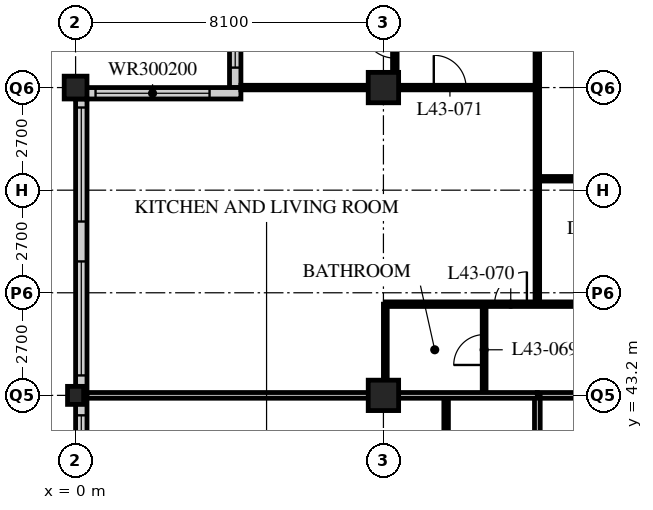
"""IFC4 building model, lengths in metres.
Left out: names, types, materials, properties, quantities, classifications, styles, units other than length and angle.
Written with IfcOpenShell. Run it as: python <this file> out.ifc"""

import sys

from ifc_helpers import new_model, si_unit, direction, frame, frame_2d, origin, origin_2d, place, context, subcontext, project, spatial, rectangle, hollow_rectangle, i_section, extrude, element, fill, save


model = new_model("IFC4")
c1 = context("Model", 3, precision=1e-05, world=origin(), true_north=direction((0.0, 1.0)))
c2 = subcontext(c1, "Body", "Model", "MODEL_VIEW")
j1 = project(units=[si_unit("LENGTHUNIT", "METRE"), si_unit("PLANEANGLEUNIT", "RADIAN")], contexts=[c1])
p1 = place(None, origin())
s1 = spatial("IfcSite", under=j1, at=p1, CompositionType="ELEMENT")
p2 = place(p1, origin())
s2 = spatial("IfcBuilding", under=s1, at=p2, CompositionType="ELEMENT")
p3 = place(p2, frame((0.0, 0.0, 170.4)))
s3 = spatial("IfcBuildingStorey", under=s2, at=p3, CompositionType="ELEMENT", Elevation=170.4)
p4 = place(p3, frame((0.0, 43.2, 0.0), z_axis=(0.0, 0.0, 1.0), x_axis=(1.0, 0.0, 0.0)))
e1 = element("IfcColumn", 1, at=p4, inside=s3, PredefinedType="COLUMN", context=c2, shape_type="SweptSolid", body=[
    extrude(i_section(OverallWidth=0.424, OverallDepth=0.475, WebThickness=0.048, FlangeThickness=0.077, FilletRadius=0.015, at=origin_2d()), origin(), (0.0, 0.0, 1.0), 3.6),
])
p5 = place(p3, frame((0.0, 51.3, 0.0), z_axis=(0.0, 0.0, 1.0), x_axis=(1.0, 0.0, 0.0)))
e2 = element("IfcColumn", 2, at=p5, inside=s3, PredefinedType="COLUMN", context=c2, shape_type="SweptSolid", body=[
    extrude(hollow_rectangle(XDim=0.6, YDim=0.6, WallThickness=0.05, at=origin_2d()), origin(), (0.0, 0.0, 1.0), 3.6),
])
for number, where, z_axis, x_axis in (
    (3, (8.1, 43.2, 0.0), (0.0, 0.0, 1.0), (1.0, 0.0, 0.0)),
    (4, (8.1, 51.3, 0.0), (0.0, 0.0, 1.0), (1.0, 0.0, 0.0)),
):
    element("IfcColumn", number, at=place(p3, frame(where, z_axis=z_axis, x_axis=x_axis)), inside=s3, PredefinedType="COLUMN", context=c2, shape_type="SweptSolid", body=[
        extrude(hollow_rectangle(XDim=0.8, YDim=0.8, WallThickness=0.08, at=origin_2d()), origin(), (0.0, 0.0, 1.0), 3.6),
    ])
p6 = place(p3, frame((4.2, 55.05, 0.0), z_axis=(0.0, 0.0, 1.0), x_axis=(0.0, -1.0, 0.0)))
e5 = element("IfcWall", 5, at=p6, inside=s3, PredefinedType="SOLIDWALL", context=c2, shape_type="SweptSolid", body=[
    extrude(rectangle(XDim=3.75, YDim=0.3, at=frame_2d((1.875, 0.0))), origin(), (0.0, 0.0, 1.0), 3.39),
])
p7 = place(p6, frame((0.225, 0.0, 0.6)))
e6 = element("IfcOpeningElement", 6, at=p7, cuts=e5, PredefinedType="OPENING", context=c2, shape_type="SweptSolid", body=[
    extrude(rectangle(XDim=3.0, YDim=2.0, at=frame_2d((1.5, 1.0))), frame((0.0, 0.16, 0.0), z_axis=(0.0, -1.0, 0.0), x_axis=(1.0, 0.0, 0.0)), (0.0, 0.0, 1.0), 0.32),
])
p8 = place(p3, frame((4.35, 51.15, 0.0), z_axis=(0.0, 0.0, 1.0), x_axis=(-1.0, 0.0, 0.0)))
e7 = element("IfcWall", 7, at=p8, inside=s3, PredefinedType="SOLIDWALL", context=c2, shape_type="SweptSolid", body=[
    extrude(rectangle(XDim=4.35, YDim=0.3, at=frame_2d((2.175, 0.0))), origin(), (0.0, 0.0, 1.0), 3.39),
])
p9 = place(p8, frame((0.825, 0.0, 0.6)))
e8 = element("IfcOpeningElement", 8, at=p9, cuts=e7, PredefinedType="OPENING", context=c2, shape_type="SweptSolid", body=[
    extrude(rectangle(XDim=3.0, YDim=2.0, at=frame_2d((1.5, 1.0))), frame((0.0, 0.16, 0.0), z_axis=(0.0, -1.0, 0.0), x_axis=(1.0, 0.0, 0.0)), (0.0, 0.0, 1.0), 0.32),
])
p10 = place(p3, frame((0.15, 51.0, 0.0), z_axis=(0.0, 0.0, 1.0), x_axis=(0.0, -1.0, 0.0)))
e9 = element("IfcWall", 9, at=p10, inside=s3, PredefinedType="SOLIDWALL", context=c2, shape_type="SweptSolid", body=[
    extrude(rectangle(XDim=32.1, YDim=0.3, at=frame_2d((16.05, 0.0))), origin(), (0.0, 0.0, 1.0), 3.39),
])
p11 = place(p10, frame((0.225, 0.0, 0.6)))
e10 = element("IfcOpeningElement", 10, at=p11, cuts=e9, PredefinedType="OPENING", context=c2, shape_type="SweptSolid", body=[
    extrude(rectangle(XDim=3.0, YDim=2.4, at=frame_2d((1.5, 1.2))), frame((0.0, 0.16, 0.0), z_axis=(0.0, -1.0, 0.0), x_axis=(1.0, 0.0, 0.0)), (0.0, 0.0, 1.0), 0.32),
])
p12 = place(p10, frame((4.275, 0.0, 0.6)))
e11 = element("IfcOpeningElement", 11, at=p12, cuts=e9, PredefinedType="OPENING", context=c2, shape_type="SweptSolid", body=[
    extrude(rectangle(XDim=3.0, YDim=2.4, at=frame_2d((1.5, 1.2))), frame((0.0, 0.16, 0.0), z_axis=(0.0, -1.0, 0.0), x_axis=(1.0, 0.0, 0.0)), (0.0, 0.0, 1.0), 0.32),
])
p13 = place(p10, frame((8.325, 0.0, 0.6)))
e12 = element("IfcOpeningElement", 12, at=p13, cuts=e9, PredefinedType="OPENING", context=c2, shape_type="SweptSolid", body=[
    extrude(rectangle(XDim=3.0, YDim=2.4, at=frame_2d((1.5, 1.2))), frame((0.0, 0.16, 0.0), z_axis=(0.0, -1.0, 0.0), x_axis=(1.0, 0.0, 0.0)), (0.0, 0.0, 1.0), 0.32),
])
p14 = place(p10, frame((12.375, 0.0, 0.6)))
e13 = element("IfcOpeningElement", 13, at=p14, cuts=e9, PredefinedType="OPENING", context=c2, shape_type="SweptSolid", body=[
    extrude(rectangle(XDim=3.0, YDim=2.4, at=frame_2d((1.5, 1.2))), frame((0.0, 0.16, 0.0), z_axis=(0.0, -1.0, 0.0), x_axis=(1.0, 0.0, 0.0)), (0.0, 0.0, 1.0), 0.32),
])
p15 = place(p10, frame((16.425, 0.0, 0.6)))
e14 = element("IfcOpeningElement", 14, at=p15, cuts=e9, PredefinedType="OPENING", context=c2, shape_type="SweptSolid", body=[
    extrude(rectangle(XDim=3.0, YDim=2.4, at=frame_2d((1.5, 1.2))), frame((0.0, 0.16, 0.0), z_axis=(0.0, -1.0, 0.0), x_axis=(1.0, 0.0, 0.0)), (0.0, 0.0, 1.0), 0.32),
])
p16 = place(p10, frame((20.475, 0.0, 0.6)))
e15 = element("IfcOpeningElement", 15, at=p16, cuts=e9, PredefinedType="OPENING", context=c2, shape_type="SweptSolid", body=[
    extrude(rectangle(XDim=3.0, YDim=2.4, at=frame_2d((1.5, 1.2))), frame((0.0, 0.16, 0.0), z_axis=(0.0, -1.0, 0.0), x_axis=(1.0, 0.0, 0.0)), (0.0, 0.0, 1.0), 0.32),
])
p17 = place(p10, frame((24.525, 0.0, 0.6)))
e16 = element("IfcOpeningElement", 16, at=p17, cuts=e9, PredefinedType="OPENING", context=c2, shape_type="SweptSolid", body=[
    extrude(rectangle(XDim=3.0, YDim=2.4, at=frame_2d((1.5, 1.2))), frame((0.0, 0.16, 0.0), z_axis=(0.0, -1.0, 0.0), x_axis=(1.0, 0.0, 0.0)), (0.0, 0.0, 1.0), 0.32),
])
p18 = place(p10, frame((28.575, 0.0, 0.6)))
e17 = element("IfcOpeningElement", 17, at=p18, cuts=e9, PredefinedType="OPENING", context=c2, shape_type="SweptSolid", body=[
    extrude(rectangle(XDim=3.0, YDim=2.4, at=frame_2d((1.5, 1.2))), frame((0.0, 0.16, 0.0), z_axis=(0.0, -1.0, 0.0), x_axis=(1.0, 0.0, 0.0)), (0.0, 0.0, 1.0), 0.32),
])
p19 = place(p3, frame((12.15, 43.2, 0.0), z_axis=(0.0, 0.0, 1.0), x_axis=(1.0, 0.0, 0.0)))
e18 = element("IfcWall", 18, at=p19, inside=s3, PredefinedType="PARTITIONING", context=c2, shape_type="SweptSolid", body=[
    extrude(rectangle(XDim=32.4, YDim=0.15, at=frame_2d((16.2, 0.0))), origin(), (0.0, 0.0, 1.0), 2.778),
])
p20 = place(p19, frame((4.95, 0.0, 0.0)))
e19 = element("IfcOpeningElement", 19, at=p20, cuts=e18, PredefinedType="OPENING", context=c2, shape_type="SweptSolid", body=[
    extrude(rectangle(XDim=1.0, YDim=2.1, at=frame_2d((0.5, 1.05))), frame((0.0, 0.085, 0.0), z_axis=(0.0, -1.0, 0.0), x_axis=(1.0, 0.0, 0.0)), (0.0, 0.0, 1.0), 0.17),
])
p21 = place(p19, frame((13.05, 0.0, 0.0)))
e20 = element("IfcOpeningElement", 20, at=p21, cuts=e18, PredefinedType="OPENING", context=c2, shape_type="SweptSolid", body=[
    extrude(rectangle(XDim=1.0, YDim=2.1, at=frame_2d((0.5, 1.05))), frame((0.0, 0.085, 0.0), z_axis=(0.0, -1.0, 0.0), x_axis=(1.0, 0.0, 0.0)), (0.0, 0.0, 1.0), 0.17),
])
p22 = place(p19, frame((21.15, 0.0, 0.0)))
e21 = element("IfcOpeningElement", 21, at=p22, cuts=e18, PredefinedType="OPENING", context=c2, shape_type="SweptSolid", body=[
    extrude(rectangle(XDim=1.0, YDim=2.1, at=frame_2d((0.5, 1.05))), frame((0.0, 0.085, 0.0), z_axis=(0.0, -1.0, 0.0), x_axis=(1.0, 0.0, 0.0)), (0.0, 0.0, 1.0), 0.17),
])
p23 = place(p19, frame((29.875, 0.0, 0.0)))
e22 = element("IfcOpeningElement", 22, at=p23, cuts=e18, PredefinedType="OPENING", context=c2, shape_type="SweptSolid", body=[
    extrude(rectangle(XDim=1.0, YDim=2.1, at=frame_2d((0.5, 1.05))), frame((0.0, 0.085, 0.0), z_axis=(0.0, -1.0, 0.0), x_axis=(1.0, 0.0, 0.0)), (0.0, 0.0, 1.0), 0.17),
])
p24 = place(p19, frame((1.525, 0.0, 0.0)))
e23 = element("IfcOpeningElement", 23, at=p24, cuts=e18, PredefinedType="OPENING", context=c2, shape_type="SweptSolid", body=[
    extrude(rectangle(XDim=1.0, YDim=2.1, at=frame_2d((0.5, 1.05))), frame((0.0, 0.085, 0.0), z_axis=(0.0, -1.0, 0.0), x_axis=(1.0, 0.0, 0.0)), (0.0, 0.0, 1.0), 0.17),
])
p25 = place(p3, frame((12.15, 18.9, 0.0), z_axis=(0.0, 0.0, 1.0), x_axis=(0.0, 1.0, 0.0)))
e24 = element("IfcWall", 24, at=p25, inside=s3, PredefinedType="PARTITIONING", context=c2, shape_type="SweptSolid", body=[
    extrude(rectangle(XDim=24.3, YDim=0.15, at=frame_2d((12.15, 0.0))), origin(), (0.0, 0.0, 1.0), 3.39),
])
p26 = place(p25, frame((2.35, 0.0, 0.0)))
e25 = element("IfcOpeningElement", 25, at=p26, cuts=e24, PredefinedType="OPENING", context=c2, shape_type="SweptSolid", body=[
    extrude(rectangle(XDim=1.0, YDim=2.1, at=frame_2d((0.5, 1.05))), frame((0.0, 0.085, 0.0), z_axis=(0.0, -1.0, 0.0), x_axis=(1.0, 0.0, 0.0)), (0.0, 0.0, 1.0), 0.17),
])
p27 = place(p25, frame((6.4, 0.0, 0.0)))
e26 = element("IfcOpeningElement", 26, at=p27, cuts=e24, PredefinedType="OPENING", context=c2, shape_type="SweptSolid", body=[
    extrude(rectangle(XDim=1.0, YDim=2.1, at=frame_2d((0.5, 1.05))), frame((0.0, 0.085, 0.0), z_axis=(0.0, -1.0, 0.0), x_axis=(1.0, 0.0, 0.0)), (0.0, 0.0, 1.0), 0.17),
])
p28 = place(p25, frame((8.5, 0.0, 0.0)))
e27 = element("IfcOpeningElement", 27, at=p28, cuts=e24, PredefinedType="OPENING", context=c2, shape_type="SweptSolid", body=[
    extrude(rectangle(XDim=1.0, YDim=2.1, at=frame_2d((0.5, 1.05))), frame((0.0, 0.085, 0.0), z_axis=(0.0, -1.0, 0.0), x_axis=(1.0, 0.0, 0.0)), (0.0, 0.0, 1.0), 0.17),
])
p29 = place(p25, frame((16.6, 0.0, 0.0)))
e28 = element("IfcOpeningElement", 28, at=p29, cuts=e24, PredefinedType="OPENING", context=c2, shape_type="SweptSolid", body=[
    extrude(rectangle(XDim=1.0, YDim=2.1, at=frame_2d((0.5, 1.05))), frame((0.0, 0.085, 0.0), z_axis=(0.0, -1.0, 0.0), x_axis=(1.0, 0.0, 0.0)), (0.0, 0.0, 1.0), 0.17),
])
p30 = place(p3, frame((9.75, 27.0, 0.0), z_axis=(0.0, 0.0, 1.0), x_axis=(0.0, 1.0, 0.0)))
e29 = element("IfcWall", 29, at=p30, inside=s3, PredefinedType="PARTITIONING", context=c2, shape_type="SweptSolid", body=[
    extrude(rectangle(XDim=16.2, YDim=0.12, at=frame_2d((8.1, 0.0))), origin(), (0.0, 0.0, 1.0), 3.39),
])
p31 = place(p30, frame((0.975, 0.0, 0.0)))
e30 = element("IfcOpeningElement", 30, at=p31, cuts=e29, PredefinedType="OPENING", context=c2, shape_type="SweptSolid", body=[
    extrude(rectangle(XDim=0.85, YDim=2.1, at=frame_2d((0.425, 1.05))), frame((0.0, 0.07, 0.0), z_axis=(0.0, -1.0, 0.0), x_axis=(1.0, 0.0, 0.0)), (0.0, 0.0, 1.0), 0.14),
])
p32 = place(p30, frame((4.375, 0.0, 0.0)))
e31 = element("IfcOpeningElement", 31, at=p32, cuts=e29, PredefinedType="OPENING", context=c2, shape_type="SweptSolid", body=[
    extrude(rectangle(XDim=0.85, YDim=2.1, at=frame_2d((0.425, 1.05))), frame((0.0, 0.07, 0.0), z_axis=(0.0, -1.0, 0.0), x_axis=(1.0, 0.0, 0.0)), (0.0, 0.0, 1.0), 0.14),
])
p33 = place(p30, frame((9.075, 0.0, 0.0)))
e32 = element("IfcOpeningElement", 32, at=p33, cuts=e29, PredefinedType="OPENING", context=c2, shape_type="SweptSolid", body=[
    extrude(rectangle(XDim=0.85, YDim=2.1, at=frame_2d((0.425, 1.05))), frame((0.0, 0.07, 0.0), z_axis=(0.0, -1.0, 0.0), x_axis=(1.0, 0.0, 0.0)), (0.0, 0.0, 1.0), 0.14),
])
p34 = place(p30, frame((12.475, 0.0, 0.0)))
e33 = element("IfcOpeningElement", 33, at=p34, cuts=e29, PredefinedType="OPENING", context=c2, shape_type="SweptSolid", body=[
    extrude(rectangle(XDim=0.85, YDim=2.1, at=frame_2d((0.425, 1.05))), frame((0.0, 0.07, 0.0), z_axis=(0.0, -1.0, 0.0), x_axis=(1.0, 0.0, 0.0)), (0.0, 0.0, 1.0), 0.14),
])
p35 = place(p3, frame((10.75, 43.2, 0.0), z_axis=(0.0, 0.0, 1.0), x_axis=(0.0, 1.0, 0.0)))
e34 = element("IfcWall", 34, at=p35, inside=s3, PredefinedType="PARTITIONING", context=c2, shape_type="SweptSolid", body=[
    extrude(rectangle(XDim=2.4, YDim=0.1, at=frame_2d((1.2, 0.0))), origin(), (0.0, 0.0, 1.0), 3.39),
])
p36 = place(p35, frame((0.8, 0.0, 0.0)))
e35 = element("IfcOpeningElement", 35, at=p36, cuts=e34, PredefinedType="OPENING", context=c2, shape_type="SweptSolid", body=[
    extrude(rectangle(XDim=0.8, YDim=2.1, at=frame_2d((0.4, 1.05))), frame((0.0, 0.06, 0.0), z_axis=(0.0, -1.0, 0.0), x_axis=(1.0, 0.0, 0.0)), (0.0, 0.0, 1.0), 0.12),
])
p37 = place(p3, frame((8.15, 43.2, 0.0), z_axis=(0.0, 0.0, 1.0), x_axis=(0.0, 1.0, 0.0)))
e36 = element("IfcWall", 36, at=p37, inside=s3, PredefinedType="PARTITIONING", context=c2, shape_type="SweptSolid", body=[
    extrude(rectangle(XDim=2.4, YDim=0.1, at=frame_2d((1.2, 0.0))), origin(), (0.0, 0.0, 1.0), 2.778),
])
p38 = place(p3, frame((8.15, 45.6, 0.0), z_axis=(0.0, 0.0, 1.0), x_axis=(1.0, 0.0, 0.0)))
e37 = element("IfcWall", 37, at=p38, inside=s3, PredefinedType="PARTITIONING", context=c2, shape_type="SweptSolid", body=[
    extrude(rectangle(XDim=40.4, YDim=0.12, at=frame_2d((20.2, 0.0))), origin(), (0.0, 0.0, 1.0), 3.39),
])
p39 = place(p38, frame((9.025, 0.0, 0.0)))
e38 = element("IfcOpeningElement", 38, at=p39, cuts=e37, PredefinedType="OPENING", context=c2, shape_type="SweptSolid", body=[
    extrude(rectangle(XDim=0.85, YDim=2.1, at=frame_2d((0.425, 1.05))), frame((0.0, 0.07, 0.0), z_axis=(0.0, -1.0, 0.0), x_axis=(1.0, 0.0, 0.0)), (0.0, 0.0, 1.0), 0.14),
])
p40 = place(p38, frame((12.425, 0.0, 0.0)))
e39 = element("IfcOpeningElement", 39, at=p40, cuts=e37, PredefinedType="OPENING", context=c2, shape_type="SweptSolid", body=[
    extrude(rectangle(XDim=0.85, YDim=2.1, at=frame_2d((0.425, 1.05))), frame((0.0, 0.07, 0.0), z_axis=(0.0, -1.0, 0.0), x_axis=(1.0, 0.0, 0.0)), (0.0, 0.0, 1.0), 0.14),
])
p41 = place(p38, frame((17.125, 0.0, 0.0)))
e40 = element("IfcOpeningElement", 40, at=p41, cuts=e37, PredefinedType="OPENING", context=c2, shape_type="SweptSolid", body=[
    extrude(rectangle(XDim=0.85, YDim=2.1, at=frame_2d((0.425, 1.05))), frame((0.0, 0.07, 0.0), z_axis=(0.0, -1.0, 0.0), x_axis=(1.0, 0.0, 0.0)), (0.0, 0.0, 1.0), 0.14),
])
p42 = place(p38, frame((20.525, 0.0, 0.0)))
e41 = element("IfcOpeningElement", 41, at=p42, cuts=e37, PredefinedType="OPENING", context=c2, shape_type="SweptSolid", body=[
    extrude(rectangle(XDim=0.85, YDim=2.1, at=frame_2d((0.425, 1.05))), frame((0.0, 0.07, 0.0), z_axis=(0.0, -1.0, 0.0), x_axis=(1.0, 0.0, 0.0)), (0.0, 0.0, 1.0), 0.14),
])
p43 = place(p38, frame((25.225, 0.0, 0.0)))
e42 = element("IfcOpeningElement", 42, at=p43, cuts=e37, PredefinedType="OPENING", context=c2, shape_type="SweptSolid", body=[
    extrude(rectangle(XDim=0.85, YDim=2.1, at=frame_2d((0.425, 1.05))), frame((0.0, 0.07, 0.0), z_axis=(0.0, -1.0, 0.0), x_axis=(1.0, 0.0, 0.0)), (0.0, 0.0, 1.0), 0.14),
])
p44 = place(p38, frame((28.625, 0.0, 0.0)))
e43 = element("IfcOpeningElement", 43, at=p44, cuts=e37, PredefinedType="OPENING", context=c2, shape_type="SweptSolid", body=[
    extrude(rectangle(XDim=0.85, YDim=2.1, at=frame_2d((0.425, 1.05))), frame((0.0, 0.07, 0.0), z_axis=(0.0, -1.0, 0.0), x_axis=(1.0, 0.0, 0.0)), (0.0, 0.0, 1.0), 0.14),
])
p45 = place(p38, frame((32.825, 0.0, 0.0)))
e44 = element("IfcOpeningElement", 44, at=p45, cuts=e37, PredefinedType="OPENING", context=c2, shape_type="SweptSolid", body=[
    extrude(rectangle(XDim=0.85, YDim=2.1, at=frame_2d((0.425, 1.05))), frame((0.0, 0.07, 0.0), z_axis=(0.0, -1.0, 0.0), x_axis=(1.0, 0.0, 0.0)), (0.0, 0.0, 1.0), 0.14),
])
p46 = place(p38, frame((36.675, 0.0, 0.0)))
e45 = element("IfcOpeningElement", 45, at=p46, cuts=e37, PredefinedType="OPENING", context=c2, shape_type="SweptSolid", body=[
    extrude(rectangle(XDim=0.85, YDim=2.1, at=frame_2d((0.425, 1.05))), frame((0.0, 0.07, 0.0), z_axis=(0.0, -1.0, 0.0), x_axis=(1.0, 0.0, 0.0)), (0.0, 0.0, 1.0), 0.14),
])
p47 = place(p38, frame((6.725, 0.0, 0.0)))
e46 = element("IfcOpeningElement", 46, at=p47, cuts=e37, PredefinedType="OPENING", context=c2, shape_type="SweptSolid", body=[
    extrude(rectangle(XDim=0.85, YDim=2.1, at=frame_2d((0.425, 1.05))), frame((0.0, 0.07, 0.0), z_axis=(0.0, -1.0, 0.0), x_axis=(1.0, 0.0, 0.0)), (0.0, 0.0, 1.0), 0.14),
])
p48 = place(p38, frame((2.875, 0.0, 0.0)))
e47 = element("IfcOpeningElement", 47, at=p48, cuts=e37, PredefinedType="OPENING", context=c2, shape_type="SweptSolid", body=[
    extrude(rectangle(XDim=0.85, YDim=2.1, at=frame_2d((0.425, 1.05))), frame((0.0, 0.07, 0.0), z_axis=(0.0, -1.0, 0.0), x_axis=(1.0, 0.0, 0.0)), (0.0, 0.0, 1.0), 0.14),
])
p49 = place(p3, frame((12.15, 45.6, 0.0), z_axis=(0.0, 0.0, 1.0), x_axis=(0.0, 1.0, 0.0)))
e48 = element("IfcWall", 48, at=p49, inside=s3, PredefinedType="PARTITIONING", context=c2, shape_type="SweptSolid", body=[
    extrude(rectangle(XDim=13.5, YDim=0.12, at=frame_2d((6.75, 0.0))), origin(), (0.0, 0.0, 1.0), 3.39),
])
p50 = place(p3, frame((12.15, 51.3, 0.0), z_axis=(0.0, 0.0, 1.0), x_axis=(-1.0, 0.0, 0.0)))
e49 = element("IfcWall", 49, at=p50, inside=s3, PredefinedType="PARTITIONING", context=c2, shape_type="SweptSolid", body=[
    extrude(rectangle(XDim=7.8, YDim=0.12, at=frame_2d((3.9, 0.0))), origin(), (0.0, 0.0, 1.0), 2.778),
])
p51 = place(p50, frame((1.875, 0.0, 0.0)))
e50 = element("IfcOpeningElement", 50, at=p51, cuts=e49, PredefinedType="OPENING", context=c2, shape_type="SweptSolid", body=[
    extrude(rectangle(XDim=0.85, YDim=2.1, at=frame_2d((0.425, 1.05))), frame((0.0, 0.07, 0.0), z_axis=(0.0, -1.0, 0.0), x_axis=(1.0, 0.0, 0.0)), (0.0, 0.0, 1.0), 0.14),
])
p52 = place(p3, frame((0.3, 43.2, 0.0), z_axis=(0.0, 0.0, 1.0), x_axis=(1.0, 0.0, 0.0)))
e51 = element("IfcWall", 51, at=p52, inside=s3, PredefinedType="PARTITIONING", context=c2, shape_type="SweptSolid", body=[
    extrude(rectangle(XDim=11.85, YDim=0.15, at=frame_2d((5.925, 0.0))), origin(), (0.0, 0.0, 1.0), 2.778),
])
p53 = place(p3, frame((8.4, 55.06, 0.0), z_axis=(0.0, 0.0, 1.0), x_axis=(0.0, -1.0, 0.0)))
e52 = element("IfcWall", 52, at=p53, inside=s3, PredefinedType="PARTITIONING", context=c2, shape_type="SweptSolid", body=[
    extrude(rectangle(XDim=3.76, YDim=0.12, at=frame_2d((1.88, 0.0))), origin(), (0.0, 0.0, 1.0), 3.39),
])
p54 = place(p53, frame((2.135, 0.0, 0.0)))
e53 = element("IfcOpeningElement", 53, at=p54, cuts=e52, PredefinedType="OPENING", context=c2, shape_type="SweptSolid", body=[
    extrude(rectangle(XDim=0.85, YDim=2.1, at=frame_2d((0.425, 1.05))), frame((0.0, 0.07, 0.0), z_axis=(0.0, -1.0, 0.0), x_axis=(1.0, 0.0, 0.0)), (0.0, 0.0, 1.0), 0.14),
])
p55 = place(p3, frame((12.15, 48.9, 0.0), z_axis=(0.0, 0.0, 1.0), x_axis=(1.0, 0.0, 0.0)))
e54 = element("IfcWall", 54, at=p55, inside=s3, PredefinedType="PARTITIONING", context=c2, shape_type="SweptSolid", body=[
    extrude(rectangle(XDim=4.05, YDim=0.12, at=frame_2d((2.025, 0.0))), origin(), (0.0, 0.0, 1.0), 3.39),
])
p56 = place(p55, frame((1.6, 0.0, 0.0)))
e55 = element("IfcOpeningElement", 55, at=p56, cuts=e54, PredefinedType="OPENING", context=c2, shape_type="SweptSolid", body=[
    extrude(rectangle(XDim=0.85, YDim=2.1, at=frame_2d((0.425, 1.05))), frame((0.0, 0.07, 0.0), z_axis=(0.0, -1.0, 0.0), x_axis=(1.0, 0.0, 0.0)), (0.0, 0.0, 1.0), 0.14),
])
p57 = place(p7, origin())
e56 = element("IfcWindow", 56, at=p57, inside=s3, PartitioningType="SINGLE_PANEL", PredefinedType="WINDOW", context=c2, shape_type="SweptSolid", body=[
    extrude(rectangle(XDim=3.0, YDim=2.0, at=frame_2d((1.5, 1.0))), frame((0.0, 0.03, 0.0), z_axis=(0.0, -1.0, 0.0), x_axis=(1.0, 0.0, 0.0)), (0.0, 0.0, 1.0), 0.06),
])
fill(e6, e56)
p58 = place(p9, origin())
e57 = element("IfcWindow", 57, at=p58, inside=s3, PartitioningType="SINGLE_PANEL", PredefinedType="WINDOW", context=c2, shape_type="SweptSolid", body=[
    extrude(rectangle(XDim=3.0, YDim=2.0, at=frame_2d((1.5, 1.0))), frame((0.0, 0.03, 0.0), z_axis=(0.0, -1.0, 0.0), x_axis=(1.0, 0.0, 0.0)), (0.0, 0.0, 1.0), 0.06),
])
fill(e8, e57)
p59 = place(p11, origin())
e58 = element("IfcWindow", 58, at=p59, inside=s3, PartitioningType="SINGLE_PANEL", PredefinedType="WINDOW", context=c2, shape_type="SweptSolid", body=[
    extrude(rectangle(XDim=3.0, YDim=2.4, at=frame_2d((1.5, 1.2))), frame((0.0, 0.03, 0.0), z_axis=(0.0, -1.0, 0.0), x_axis=(1.0, 0.0, 0.0)), (0.0, 0.0, 1.0), 0.06),
])
fill(e10, e58)
p60 = place(p12, origin())
e59 = element("IfcWindow", 59, at=p60, inside=s3, PartitioningType="SINGLE_PANEL", PredefinedType="WINDOW", context=c2, shape_type="SweptSolid", body=[
    extrude(rectangle(XDim=3.0, YDim=2.4, at=frame_2d((1.5, 1.2))), frame((0.0, 0.03, 0.0), z_axis=(0.0, -1.0, 0.0), x_axis=(1.0, 0.0, 0.0)), (0.0, 0.0, 1.0), 0.06),
])
fill(e11, e59)
p61 = place(p13, origin())
e60 = element("IfcWindow", 60, at=p61, inside=s3, PartitioningType="SINGLE_PANEL", PredefinedType="WINDOW", context=c2, shape_type="SweptSolid", body=[
    extrude(rectangle(XDim=3.0, YDim=2.4, at=frame_2d((1.5, 1.2))), frame((0.0, 0.03, 0.0), z_axis=(0.0, -1.0, 0.0), x_axis=(1.0, 0.0, 0.0)), (0.0, 0.0, 1.0), 0.06),
])
fill(e12, e60)
p62 = place(p36, origin())
e61 = element("IfcDoor", 61, at=p62, inside=s3, OperationType="SINGLE_SWING_LEFT", PredefinedType="DOOR", context=c2, shape_type="SweptSolid", body=[
    extrude(rectangle(XDim=0.8, YDim=2.1, at=frame_2d((0.4, 1.05))), frame((0.0, 0.025, 0.0), z_axis=(0.0, -1.0, 0.0), x_axis=(1.0, 0.0, 0.0)), (0.0, 0.0, 1.0), 0.05),
])
fill(e35, e61)
p63 = place(p48, origin())
e62 = element("IfcDoor", 62, at=p63, inside=s3, OperationType="SINGLE_SWING_RIGHT", PredefinedType="DOOR", context=c2, shape_type="SweptSolid", body=[
    extrude(rectangle(XDim=0.85, YDim=2.1, at=frame_2d((0.425, 1.05))), frame((0.0, 0.025, 0.0), z_axis=(0.0, -1.0, 0.0), x_axis=(1.0, 0.0, 0.0)), (0.0, 0.0, 1.0), 0.05),
])
fill(e47, e62)
p64 = place(p51, origin())
e63 = element("IfcDoor", 63, at=p64, inside=s3, OperationType="SINGLE_SWING_LEFT", PredefinedType="DOOR", context=c2, shape_type="SweptSolid", body=[
    extrude(rectangle(XDim=0.85, YDim=2.1, at=frame_2d((0.425, 1.05))), frame((0.0, 0.025, 0.0), z_axis=(0.0, -1.0, 0.0), x_axis=(1.0, 0.0, 0.0)), (0.0, 0.0, 1.0), 0.05),
])
fill(e50, e63)
p65 = place(p54, origin())
e64 = element("IfcDoor", 64, at=p65, inside=s3, OperationType="SINGLE_SWING_RIGHT", PredefinedType="DOOR", context=c2, shape_type="SweptSolid", body=[
    extrude(rectangle(XDim=0.85, YDim=2.1, at=frame_2d((0.425, 1.05))), frame((0.0, 0.025, 0.0), z_axis=(0.0, -1.0, 0.0), x_axis=(1.0, 0.0, 0.0)), (0.0, 0.0, 1.0), 0.05),
])
fill(e53, e64)
save(model, sys.argv[1])
